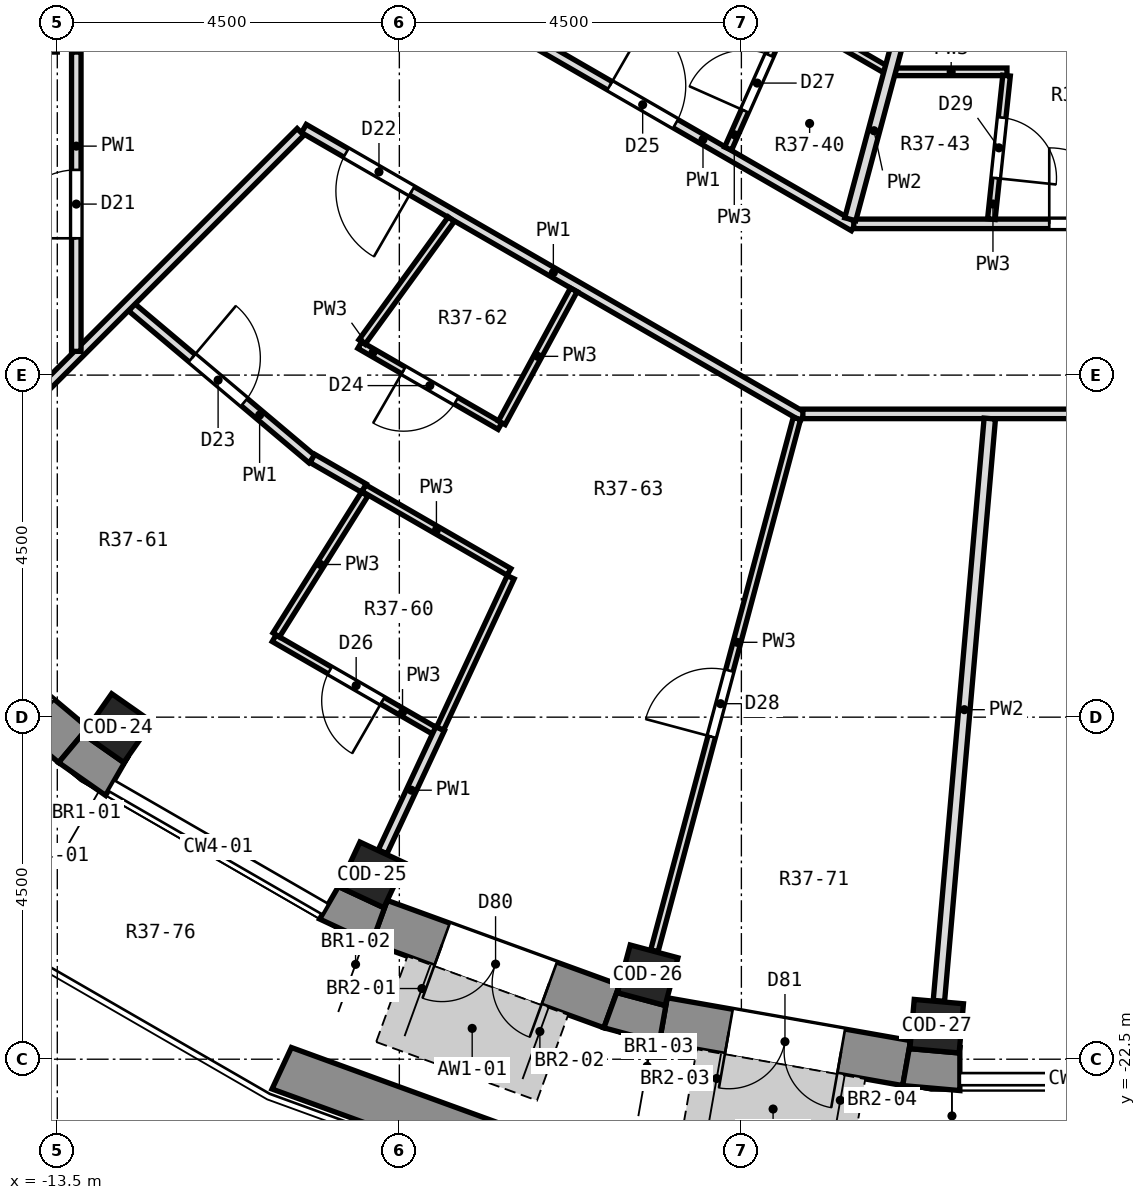
"""IFC4 building model, lengths in metres.
Left out: names, types, materials, properties, quantities, classifications, styles, units other than length and angle.
Written with IfcOpenShell. Run it as: python <this file> out.ifc"""

import sys

from ifc_helpers import new_model, si_unit, direction, frame, frame_2d, origin, origin_2d, place, context, subcontext, project, spatial, polyline, rectangle, outline, extrude, element, fill, save


model = new_model("IFC4")
c1 = context("Model", 3, precision=1e-05, world=origin(), true_north=direction((0.0, 1.0)))
c2 = subcontext(c1, "Body", "Model", "MODEL_VIEW")
j1 = project(units=[si_unit("LENGTHUNIT", "METRE"), si_unit("PLANEANGLEUNIT", "RADIAN")], contexts=[c1])
p1 = place(None, origin())
s1 = spatial("IfcSite", under=j1, at=p1, CompositionType="ELEMENT")
p2 = place(p1, origin())
s2 = spatial("IfcBuilding", under=s1, at=p2, CompositionType="ELEMENT")
p3 = place(p2, frame((0.0, 0.0, 269.3)))
s3 = spatial("IfcBuildingStorey", under=s2, at=p3, CompositionType="ELEMENT", Elevation=269.3)
for number, where, z_axis, x_axis in (
    (1, (-12.705, -18.144, 0.0), (0.0, 0.0, 1.0), (-0.574, -0.819, 0.0)),
    (2, (-9.361, -20.075, 0.0), (0.0, 0.0, 1.0), (-0.423, -0.906, 0.0)),
    (3, (-5.733, -21.395, 0.0), (0.0, 0.0, 1.0), (-0.259, -0.966, 0.0)),
    (4, (-1.93, -22.066, 0.0), (0.0, 0.0, 1.0), (-0.087, -0.996, 0.0)),
):
    element("IfcColumn", number, at=place(p3, frame(where, z_axis=z_axis, x_axis=x_axis)), inside=s3, PredefinedType="COLUMN", context=c2, shape_type="SweptSolid", body=[
        extrude(rectangle(XDim=0.65, YDim=0.65, at=origin_2d()), origin(), (0.0, 0.0, 1.0), 3.3),
    ])
p4 = place(p3, frame((-15.781, -16.277, 0.0), z_axis=(0.0, 0.0, 1.0), x_axis=(0.766056773982, -0.64277291405, 0.0)))
e5 = element("IfcWall", 5, at=p4, inside=s3, PredefinedType="SOLIDWALL", context=c2, shape_type="SweptSolid", body=[
    extrude(rectangle(XDim=3.252, YDim=0.6, at=frame_2d((1.626, 0.0))), origin(), (0.0, 0.0, 1.0), 2.9),
])
p5 = place(p4, frame((0.576, 0.0, 0.9)))
e6 = element("IfcOpeningElement", 6, at=p5, cuts=e5, PredefinedType="OPENING", context=c2, shape_type="SweptSolid", body=[
    extrude(rectangle(XDim=2.1, YDim=1.8, at=frame_2d((1.05, 0.9))), frame((0.0, 0.312, 0.0), z_axis=(0.0, -1.0, 0.0), x_axis=(1.0, 0.0, 0.0)), (0.0, 0.0, 1.0), 0.624),
])
p6 = place(p3, frame((-9.262, -20.693, 0.0), z_axis=(0.0, 0.0, 1.0), x_axis=(0.939679383794, -0.342056509473, 0.0)))
e7 = element("IfcWall", 7, at=p6, inside=s3, PredefinedType="SOLIDWALL", context=c2, shape_type="SweptSolid", body=[
    extrude(rectangle(XDim=3.252, YDim=0.6, at=frame_2d((1.626, 0.0))), origin(), (0.0, 0.0, 1.0), 2.9),
])
p7 = place(p6, frame((0.876, 0.0, 0.0)))
e8 = element("IfcOpeningElement", 8, at=p7, cuts=e7, PredefinedType="OPENING", context=c2, shape_type="SweptSolid", body=[
    extrude(rectangle(XDim=1.5, YDim=2.4, at=frame_2d((0.75, 1.2))), frame((0.0, 0.312, 0.0), z_axis=(0.0, -1.0, 0.0), x_axis=(1.0, 0.0, 0.0)), (0.0, 0.0, 1.0), 0.624),
])
p8 = place(p3, frame((-5.528, -21.987, 0.0), z_axis=(0.0, 0.0, 1.0), x_axis=(0.984806225186, -0.173656842178, 0.0)))
e9 = element("IfcWall", 9, at=p8, inside=s3, PredefinedType="SOLIDWALL", context=c2, shape_type="SweptSolid", body=[
    extrude(rectangle(XDim=3.252, YDim=0.6, at=frame_2d((1.626, 0.0))), origin(), (0.0, 0.0, 1.0), 2.9),
])
p9 = place(p8, frame((0.876, 0.0, 0.0)))
e10 = element("IfcOpeningElement", 10, at=p9, cuts=e9, PredefinedType="OPENING", context=c2, shape_type="SweptSolid", body=[
    extrude(rectangle(XDim=1.5, YDim=2.4, at=frame_2d((0.75, 1.2))), frame((0.0, 0.312, 0.0), z_axis=(0.0, -1.0, 0.0), x_axis=(1.0, 0.0, 0.0)), (0.0, 0.0, 1.0), 0.624),
])
p10 = place(p3, origin())
e11 = element("IfcWall", 11, at=p10, inside=s3, PredefinedType="SOLIDWALL", context=c2, shape_type="SweptSolid", body=[
    extrude(outline(polyline([(-12.864, -19.03), (-12.564, -18.51), (-12.625, -18.597), (-13.157, -18.224), (-13.097, -18.137), (-13.482, -18.597), (-12.864, -19.03)])), origin(), (0.0, 0.0, 1.0), 2.9),
])
p11 = place(p3, origin())
e12 = element("IfcWall", 12, at=p11, inside=s3, PredefinedType="SOLIDWALL", context=c2, shape_type="SweptSolid", body=[
    extrude(outline(polyline([(-10.048, -20.656), (-9.364, -20.975), (-9.159, -20.411), (-9.204, -20.507), (-9.793, -20.232), (-9.748, -20.136), (-10.048, -20.656)])), origin(), (0.0, 0.0, 1.0), 2.9),
])
p12 = place(p3, origin())
e13 = element("IfcWall", 13, at=p12, inside=s3, PredefinedType="SOLIDWALL", context=c2, shape_type="SweptSolid", body=[
    extrude(outline(polyline([(-5.58, -22.282), (-5.476, -21.691), (-5.503, -21.793), (-6.131, -21.625), (-6.104, -21.523), (-6.309, -22.087), (-5.58, -22.282)])), origin(), (0.0, 0.0, 1.0), 2.9),
])
p13 = place(p3, origin())
e14 = element("IfcWall", 14, at=p13, inside=s3, PredefinedType="SOLIDWALL", context=c2, shape_type="SweptSolid", body=[
    extrude(outline(polyline([(-2.378, -22.847), (-1.626, -22.913), (-1.626, -22.312), (-1.635, -22.418), (-2.283, -22.361), (-2.273, -22.256), (-2.378, -22.847)])), origin(), (0.0, 0.0, 1.0), 2.9),
])
p14 = place(p3, origin())
e15 = element("IfcWall", 15, at=p14, inside=s3, PredefinedType="PARAPET", context=c2, shape_type="SweptSolid", body=[
    extrude(outline(polyline([(-10.675, -22.892), (-6.537, -24.398), (-2.201, -25.163), (-2.149, -24.562), (-6.382, -23.816), (-10.42, -22.346), (-10.675, -22.892)])), origin(), (0.0, 0.0, 1.0), 0.5),
])
p15 = place(p3, frame((-12.521, -12.608, 0.0), z_axis=(0.0, 0.0, 1.0), x_axis=(0.764770295867, -0.644303030071, 0.0)))
e16 = element("IfcWall", 16, at=p15, inside=s3, PredefinedType="PARTITIONING", context=c2, shape_type="SweptSolid", body=[
    extrude(rectangle(XDim=3.101, YDim=0.125, at=frame_2d((1.55, 0.0))), origin(), (0.0, 0.0, 1.0), 2.9),
])
p16 = place(p15, frame((1.036, 0.0, 0.0)))
e17 = element("IfcOpeningElement", 17, at=p16, cuts=e16, PredefinedType="OPENING", context=c2, shape_type="SweptSolid", body=[
    extrude(rectangle(XDim=0.9, YDim=2.1, at=frame_2d((0.45, 1.05))), frame((0.0, 0.074, 0.0), z_axis=(0.0, -1.0, 0.0), x_axis=(1.0, 0.0, 0.0)), (0.0, 0.0, 1.0), 0.149),
])
p17 = place(p3, frame((-10.647, -16.962, 0.0), z_axis=(0.0, 0.0, 1.0), x_axis=(0.866072215893, -0.499918910283, 0.0)))
e18 = element("IfcWall", 18, at=p17, inside=s3, PredefinedType="PARTITIONING", context=c2, shape_type="SweptSolid", body=[
    extrude(rectangle(XDim=2.438, YDim=0.1, at=frame_2d((1.219, 0.0))), origin(), (0.0, 0.0, 1.0), 2.9),
])
p18 = place(p17, frame((0.846, 0.0, 0.0)))
e19 = element("IfcOpeningElement", 19, at=p18, cuts=e18, PredefinedType="OPENING", context=c2, shape_type="SweptSolid", body=[
    extrude(rectangle(XDim=0.8, YDim=2.1, at=frame_2d((0.4, 1.05))), frame((0.0, 0.062, 0.0), z_axis=(0.0, -1.0, 0.0), x_axis=(1.0, 0.0, 0.0)), (0.0, 0.0, 1.0), 0.124),
])
p19 = place(p3, frame((-9.467, -14.986, 0.0), z_axis=(0.0, 0.0, 1.0), x_axis=(0.866006764117, -0.500032283461, 0.0)))
e20 = element("IfcWall", 20, at=p19, inside=s3, PredefinedType="PARTITIONING", context=c2, shape_type="SweptSolid", body=[
    extrude(rectangle(XDim=2.205, YDim=0.1, at=frame_2d((1.103, 0.0))), origin(), (0.0, 0.0, 1.0), 2.9),
])
p20 = place(p3, frame((-10.144, -14.596, 0.0), z_axis=(0.0, 0.0, 1.0), x_axis=(0.866487258755, -0.499199189117, 0.0)))
e21 = element("IfcWall", 21, at=p20, inside=s3, PredefinedType="PARTITIONING", context=c2, shape_type="SweptSolid", body=[
    extrude(rectangle(XDim=0.781, YDim=0.125, at=frame_2d((0.391, 0.0))), origin(), (0.0, 0.0, 1.0), 2.9),
])
p21 = place(p3, frame((-9.521, -13.105, 0.0), z_axis=(0.0, 0.0, 1.0), x_axis=(0.865878308353, -0.500254690257, 0.0)))
e22 = element("IfcWall", 22, at=p21, inside=s3, PredefinedType="PARTITIONING", context=c2, shape_type="SweptSolid", body=[
    extrude(rectangle(XDim=2.131, YDim=0.1, at=frame_2d((1.065, 0.0))), origin(), (0.0, 0.0, 1.0), 2.9),
])
p22 = place(p21, frame((0.665, 0.0, 0.0)))
e23 = element("IfcOpeningElement", 23, at=p22, cuts=e22, PredefinedType="OPENING", context=c2, shape_type="SweptSolid", body=[
    extrude(rectangle(XDim=0.8, YDim=2.1, at=frame_2d((0.4, 1.05))), frame((0.0, 0.062, 0.0), z_axis=(0.0, -1.0, 0.0), x_axis=(1.0, 0.0, 0.0)), (0.0, 0.0, 1.0), 0.124),
])
p23 = place(p3, frame((-10.256, -10.256, 0.0), z_axis=(0.0, 0.0, 1.0), x_axis=(0.866032740159, -0.499987292811, 0.0)))
e24 = element("IfcWall", 24, at=p23, inside=s3, PredefinedType="PARTITIONING", context=c2, shape_type="SweptSolid", body=[
    extrude(rectangle(XDim=7.581, YDim=0.125, at=frame_2d((3.791, 0.0))), origin(), (0.0, 0.0, 1.0), 2.9),
])
p24 = place(p23, frame((0.641, 0.0, 0.0)))
e25 = element("IfcOpeningElement", 25, at=p24, cuts=e24, PredefinedType="OPENING", context=c2, shape_type="SweptSolid", body=[
    extrude(rectangle(XDim=1.0, YDim=2.1, at=frame_2d((0.5, 1.05))), frame((0.0, 0.074, 0.0), z_axis=(0.0, -1.0, 0.0), x_axis=(1.0, 0.0, 0.0)), (0.0, 0.0, 1.0), 0.149),
])
p25 = place(p3, frame((-8.426, -8.426, 0.0), z_axis=(0.0, 0.0, 1.0), x_axis=(0.866039004929, -0.499976441387, 0.0)))
e26 = element("IfcWall", 26, at=p25, inside=s3, PredefinedType="PARTITIONING", context=c2, shape_type="SweptSolid", body=[
    extrude(rectangle(XDim=6.24, YDim=0.125, at=frame_2d((3.12, 0.0))), origin(), (0.0, 0.0, 1.0), 2.9),
])
p26 = place(p25, frame((2.534, 0.0, 0.0)))
e27 = element("IfcOpeningElement", 27, at=p26, cuts=e26, PredefinedType="OPENING", context=c2, shape_type="SweptSolid", body=[
    extrude(rectangle(XDim=1.0, YDim=2.1, at=frame_2d((0.5, 1.05))), frame((0.0, 0.074, 0.0), z_axis=(0.0, -1.0, 0.0), x_axis=(1.0, 0.0, 0.0)), (0.0, 0.0, 1.0), 0.149),
])
p27 = place(p3, frame((-3.884, -8.739, 0.0), z_axis=(0.0, 0.0, 1.0), x_axis=(0.866146805758, -0.499789666634, 0.0)))
e28 = element("IfcWall", 28, at=p27, inside=s3, PredefinedType="PARTITIONING", context=c2, shape_type="SweptSolid", body=[
    extrude(rectangle(XDim=1.468, YDim=0.1, at=frame_2d((0.734, 0.0))), origin(), (0.0, 0.0, 1.0), 2.9),
])
p28 = place(p3, frame((-3.691, -14.01, 0.0), z_axis=(0.0, 0.0, 1.0), x_axis=(1.0, 0.0, 0.0)))
e29 = element("IfcWall", 29, at=p28, inside=s3, PredefinedType="PARTITIONING", context=c2, shape_type="SweptSolid", body=[
    extrude(rectangle(XDim=7.517, YDim=0.125, at=frame_2d((3.759, 0.0))), origin(), (0.0, 0.0, 1.0), 2.9),
])
p29 = place(p3, frame((-3.021, -11.51, 0.0), z_axis=(0.0, 0.0, 1.0), x_axis=(1.0, 0.0, 0.0)))
e30 = element("IfcWall", 30, at=p29, inside=s3, PredefinedType="PARTITIONING", context=c2, shape_type="SweptSolid", body=[
    extrude(rectangle(XDim=6.192, YDim=0.125, at=frame_2d((3.096, 0.0))), origin(), (0.0, 0.0, 1.0), 2.9),
])
p30 = place(p29, frame((2.572, 0.0, 0.0)))
e31 = element("IfcOpeningElement", 31, at=p30, cuts=e30, PredefinedType="OPENING", context=c2, shape_type="SweptSolid", body=[
    extrude(rectangle(XDim=1.0, YDim=2.1, at=frame_2d((0.5, 1.05))), frame((0.0, 0.074, 0.0), z_axis=(0.0, -1.0, 0.0), x_axis=(1.0, 0.0, 0.0)), (0.0, 0.0, 1.0), 0.149),
])
p31 = place(p3, frame((-2.473, -9.51, 0.0), z_axis=(0.0, 0.0, 1.0), x_axis=(1.0, 0.0, 0.0)))
e32 = element("IfcWall", 32, at=p31, inside=s3, PredefinedType="PARTITIONING", context=c2, shape_type="SweptSolid", body=[
    extrude(rectangle(XDim=1.467, YDim=0.1, at=frame_2d((0.733, 0.0))), origin(), (0.0, 0.0, 1.0), 2.9),
])
p32 = place(p3, frame((-15.426, -15.426, 0.0), z_axis=(0.0, 0.0, 1.0), x_axis=(0.707106781187, 0.707106781187, 0.0)))
e33 = element("IfcWall", 33, at=p32, inside=s3, PredefinedType="PARTITIONING", context=c2, shape_type="SweptSolid", body=[
    extrude(rectangle(XDim=7.248, YDim=0.125, at=frame_2d((3.624, 0.0))), origin(), (0.0, 0.0, 1.0), 2.9),
])
p33 = place(p3, frame((-9.492, -13.064, 0.0), z_axis=(0.0, 0.0, 1.0), x_axis=(0.587873893167, 0.80895258559, 0.0)))
e34 = element("IfcWall", 34, at=p33, inside=s3, PredefinedType="PARTITIONING", context=c2, shape_type="SweptSolid", body=[
    extrude(rectangle(XDim=1.999, YDim=0.1, at=frame_2d((1.0, 0.0))), origin(), (0.0, 0.0, 1.0), 2.9),
])
p34 = place(p3, frame((-10.619, -16.918, 0.0), z_axis=(0.0, 0.0, 1.0), x_axis=(0.531622942945, 0.84698113706, 0.0)))
e35 = element("IfcWall", 35, at=p34, inside=s3, PredefinedType="PARTITIONING", context=c2, shape_type="SweptSolid", body=[
    extrude(rectangle(XDim=2.188, YDim=0.1, at=frame_2d((1.094, 0.0))), origin(), (0.0, 0.0, 1.0), 2.9),
])
p35 = place(p3, frame((-7.652, -14.127, 0.0), z_axis=(0.0, 0.0, 1.0), x_axis=(0.476243596433, 0.879313389444, 0.0)))
e36 = element("IfcWall", 36, at=p35, inside=s3, PredefinedType="PARTITIONING", context=c2, shape_type="SweptSolid", body=[
    extrude(rectangle(XDim=1.989, YDim=0.1, at=frame_2d((0.994, 0.0))), origin(), (0.0, 0.0, 1.0), 2.9),
])
p36 = place(p3, frame((-9.22, -19.771, 0.0), z_axis=(0.0, 0.0, 1.0), x_axis=(0.423191849194, 0.906040097775, 0.0)))
e37 = element("IfcWall", 37, at=p36, inside=s3, PredefinedType="PARTITIONING", context=c2, shape_type="SweptSolid", body=[
    extrude(rectangle(XDim=1.788, YDim=0.125, at=frame_2d((0.894, 0.0))), origin(), (0.0, 0.0, 1.0), 2.9),
])
p37 = place(p3, frame((-8.464, -18.15, 0.0), z_axis=(0.0, 0.0, 1.0), x_axis=(0.422599526454, 0.906316523208, 0.0)))
e38 = element("IfcWall", 38, at=p37, inside=s3, PredefinedType="PARTITIONING", context=c2, shape_type="SweptSolid", body=[
    extrude(rectangle(XDim=2.197, YDim=0.1, at=frame_2d((1.099, 0.0))), origin(), (0.0, 0.0, 1.0), 2.9),
])
p38 = place(p3, frame((-4.675, -10.52, 0.0), z_axis=(0.0, 0.0, 1.0), x_axis=(0.40574466239, 0.913986470875, 0.0)))
e39 = element("IfcWall", 39, at=p38, inside=s3, PredefinedType="PARTITIONING", context=c2, shape_type="SweptSolid", body=[
    extrude(rectangle(XDim=1.898, YDim=0.1, at=frame_2d((0.949, 0.0))), origin(), (0.0, 0.0, 1.0), 2.9),
])
p39 = place(p38, frame((0.543, 0.0, 0.0)))
e40 = element("IfcOpeningElement", 40, at=p39, cuts=e39, PredefinedType="OPENING", context=c2, shape_type="SweptSolid", body=[
    extrude(rectangle(XDim=0.8, YDim=2.1, at=frame_2d((0.4, 1.05))), frame((0.0, 0.062, 0.0), z_axis=(0.0, -1.0, 0.0), x_axis=(1.0, 0.0, 0.0)), (0.0, 0.0, 1.0), 0.124),
])
p40 = place(p3, frame((-5.644, -21.072, 0.0), z_axis=(0.0, 0.0, 1.0), x_axis=(0.258605886827, 0.96598291667, 0.0)))
e41 = element("IfcWall", 41, at=p40, inside=s3, PredefinedType="PARTITIONING", context=c2, shape_type="SweptSolid", body=[
    extrude(rectangle(XDim=7.249, YDim=0.1, at=frame_2d((3.624, 0.0))), origin(), (0.0, 0.0, 1.0), 2.9),
])
p41 = place(p40, frame((2.914, 0.0, 0.0)))
e42 = element("IfcOpeningElement", 42, at=p41, cuts=e41, PredefinedType="OPENING", context=c2, shape_type="SweptSolid", body=[
    extrude(rectangle(XDim=0.9, YDim=2.1, at=frame_2d((0.45, 1.05))), frame((0.0, 0.062, 0.0), z_axis=(0.0, -1.0, 0.0), x_axis=(1.0, 0.0, 0.0)), (0.0, 0.0, 1.0), 0.124),
])
p42 = place(p3, frame((-3.068, -11.45, 0.0), z_axis=(0.0, 0.0, 1.0), x_axis=(0.258796817064, 0.965931782, 0.0)))
e43 = element("IfcWall", 43, at=p42, inside=s3, PredefinedType="PARTITIONING", context=c2, shape_type="SweptSolid", body=[
    extrude(rectangle(XDim=2.411, YDim=0.15, at=frame_2d((1.206, 0.0))), origin(), (0.0, 0.0, 1.0), 2.9),
])
p43 = place(p3, frame((-1.211, -11.448, 0.0), z_axis=(0.0, 0.0, 1.0), x_axis=(0.105447867905, 0.99442483233, 0.0)))
e44 = element("IfcWall", 44, at=p43, inside=s3, PredefinedType="PARTITIONING", context=c2, shape_type="SweptSolid", body=[
    extrude(rectangle(XDim=1.898, YDim=0.1, at=frame_2d((0.949, 0.0))), origin(), (0.0, 0.0, 1.0), 2.9),
])
p44 = place(p43, frame((0.543, 0.0, 0.0)))
e45 = element("IfcOpeningElement", 45, at=p44, cuts=e44, PredefinedType="OPENING", context=c2, shape_type="SweptSolid", body=[
    extrude(rectangle(XDim=0.8, YDim=2.1, at=frame_2d((0.4, 1.05))), frame((0.0, 0.062, 0.0), z_axis=(0.0, -1.0, 0.0), x_axis=(1.0, 0.0, 0.0)), (0.0, 0.0, 1.0), 0.124),
])
p45 = place(p3, frame((-1.901, -21.732, 0.0), z_axis=(0.0, 0.0, 1.0), x_axis=(0.087062572149, 0.996202845073, 0.0)))
e46 = element("IfcWall", 46, at=p45, inside=s3, PredefinedType="PARTITIONING", context=c2, shape_type="SweptSolid", body=[
    extrude(rectangle(XDim=7.689, YDim=0.15, at=frame_2d((3.845, 0.0))), origin(), (0.0, 0.0, 1.0), 2.9),
])
p46 = place(p3, frame((-13.25, -13.188, 0.0), z_axis=(0.0, 0.0, 1.0), x_axis=(0.0, 1.0, 0.0)))
e47 = element("IfcWall", 47, at=p46, inside=s3, PredefinedType="PARTITIONING", context=c2, shape_type="SweptSolid", body=[
    extrude(rectangle(XDim=3.938, YDim=0.125, at=frame_2d((1.969, 0.0))), origin(), (0.0, 0.0, 1.0), 2.9),
])
p47 = place(p46, frame((1.488, 0.0, 0.0)))
e48 = element("IfcOpeningElement", 48, at=p47, cuts=e47, PredefinedType="OPENING", context=c2, shape_type="SweptSolid", body=[
    extrude(rectangle(XDim=0.9, YDim=2.1, at=frame_2d((0.45, 1.05))), frame((0.0, 0.074, 0.0), z_axis=(0.0, -1.0, 0.0), x_axis=(1.0, 0.0, 0.0)), (0.0, 0.0, 1.0), 0.149),
])
p48 = place(p7, frame((1.5, 0.0, 0.0), z_axis=(0.0, 0.0, 1.0), x_axis=(-1.0, 0.0, 0.0)))
e49 = element("IfcDoor", 49, at=p48, inside=s3, OperationType="DOUBLE_DOOR_SINGLE_SWING", PredefinedType="DOOR", context=c2, shape_type="SweptSolid", body=[
    extrude(rectangle(XDim=1.5, YDim=2.4, at=frame_2d((0.75, 1.2))), frame((0.0, -0.075, 0.0), z_axis=(0.0, -1.0, 0.0), x_axis=(1.0, 0.0, 0.0)), (0.0, 0.0, 1.0), 0.05),
])
fill(e8, e49)
p49 = place(p9, frame((1.5, 0.0, 0.0), z_axis=(0.0, 0.0, 1.0), x_axis=(-1.0, 0.0, 0.0)))
e50 = element("IfcDoor", 50, at=p49, inside=s3, OperationType="DOUBLE_DOOR_SINGLE_SWING", PredefinedType="DOOR", context=c2, shape_type="SweptSolid", body=[
    extrude(rectangle(XDim=1.5, YDim=2.4, at=frame_2d((0.75, 1.2))), frame((0.0, -0.075, 0.0), z_axis=(0.0, -1.0, 0.0), x_axis=(1.0, 0.0, 0.0)), (0.0, 0.0, 1.0), 0.05),
])
fill(e10, e50)
p50 = place(p47, origin())
e51 = element("IfcDoor", 51, at=p50, inside=s3, OperationType="SINGLE_SWING_LEFT", PredefinedType="DOOR", context=c2, shape_type="SweptSolid", body=[
    extrude(rectangle(XDim=0.9, YDim=2.1, at=frame_2d((0.45, 1.05))), frame((0.0, 0.025, 0.0), z_axis=(0.0, -1.0, 0.0), x_axis=(1.0, 0.0, 0.0)), (0.0, 0.0, 1.0), 0.05),
])
fill(e48, e51)
p51 = place(p24, frame((1.0, 0.0, 0.0), z_axis=(0.0, 0.0, 1.0), x_axis=(-1.0, 0.0, 0.0)))
e52 = element("IfcDoor", 52, at=p51, inside=s3, OperationType="SINGLE_SWING_LEFT", PredefinedType="DOOR", context=c2, shape_type="SweptSolid", body=[
    extrude(rectangle(XDim=1.0, YDim=2.1, at=frame_2d((0.5, 1.05))), frame((0.0, 0.025, 0.0), z_axis=(0.0, -1.0, 0.0), x_axis=(1.0, 0.0, 0.0)), (0.0, 0.0, 1.0), 0.05),
])
fill(e25, e52)
p52 = place(p16, origin())
e53 = element("IfcDoor", 53, at=p52, inside=s3, OperationType="SINGLE_SWING_LEFT", PredefinedType="DOOR", context=c2, shape_type="SweptSolid", body=[
    extrude(rectangle(XDim=0.9, YDim=2.1, at=frame_2d((0.45, 1.05))), frame((0.0, 0.025, 0.0), z_axis=(0.0, -1.0, 0.0), x_axis=(1.0, 0.0, 0.0)), (0.0, 0.0, 1.0), 0.05),
])
fill(e17, e53)
p53 = place(p22, frame((0.8, 0.0, 0.0), z_axis=(0.0, 0.0, 1.0), x_axis=(-1.0, 0.0, 0.0)))
e54 = element("IfcDoor", 54, at=p53, inside=s3, OperationType="SINGLE_SWING_RIGHT", PredefinedType="DOOR", context=c2, shape_type="SweptSolid", body=[
    extrude(rectangle(XDim=0.8, YDim=2.1, at=frame_2d((0.4, 1.05))), frame((0.0, 0.025, 0.0), z_axis=(0.0, -1.0, 0.0), x_axis=(1.0, 0.0, 0.0)), (0.0, 0.0, 1.0), 0.05),
])
fill(e23, e54)
p54 = place(p26, origin())
e55 = element("IfcDoor", 55, at=p54, inside=s3, OperationType="SINGLE_SWING_LEFT", PredefinedType="DOOR", context=c2, shape_type="SweptSolid", body=[
    extrude(rectangle(XDim=1.0, YDim=2.1, at=frame_2d((0.5, 1.05))), frame((0.0, 0.025, 0.0), z_axis=(0.0, -1.0, 0.0), x_axis=(1.0, 0.0, 0.0)), (0.0, 0.0, 1.0), 0.05),
])
fill(e27, e55)
p55 = place(p18, frame((0.8, 0.0, 0.0), z_axis=(0.0, 0.0, 1.0), x_axis=(-1.0, 0.0, 0.0)))
e56 = element("IfcDoor", 56, at=p55, inside=s3, OperationType="SINGLE_SWING_LEFT", PredefinedType="DOOR", context=c2, shape_type="SweptSolid", body=[
    extrude(rectangle(XDim=0.8, YDim=2.1, at=frame_2d((0.4, 1.05))), frame((0.0, 0.025, 0.0), z_axis=(0.0, -1.0, 0.0), x_axis=(1.0, 0.0, 0.0)), (0.0, 0.0, 1.0), 0.05),
])
fill(e19, e56)
p56 = place(p39, origin())
e57 = element("IfcDoor", 57, at=p56, inside=s3, OperationType="SINGLE_SWING_LEFT", PredefinedType="DOOR", context=c2, shape_type="SweptSolid", body=[
    extrude(rectangle(XDim=0.8, YDim=2.1, at=frame_2d((0.4, 1.05))), frame((0.0, 0.025, 0.0), z_axis=(0.0, -1.0, 0.0), x_axis=(1.0, 0.0, 0.0)), (0.0, 0.0, 1.0), 0.05),
])
fill(e40, e57)
p57 = place(p41, origin())
e58 = element("IfcDoor", 58, at=p57, inside=s3, OperationType="SINGLE_SWING_LEFT", PredefinedType="DOOR", context=c2, shape_type="SweptSolid", body=[
    extrude(rectangle(XDim=0.9, YDim=2.1, at=frame_2d((0.45, 1.05))), frame((0.0, 0.025, 0.0), z_axis=(0.0, -1.0, 0.0), x_axis=(1.0, 0.0, 0.0)), (0.0, 0.0, 1.0), 0.05),
])
fill(e42, e58)
p58 = place(p44, frame((0.8, 0.0, 0.0), z_axis=(0.0, 0.0, 1.0), x_axis=(-1.0, 0.0, 0.0)))
e59 = element("IfcDoor", 59, at=p58, inside=s3, OperationType="SINGLE_SWING_RIGHT", PredefinedType="DOOR", context=c2, shape_type="SweptSolid", body=[
    extrude(rectangle(XDim=0.8, YDim=2.1, at=frame_2d((0.4, 1.05))), frame((0.0, 0.025, 0.0), z_axis=(0.0, -1.0, 0.0), x_axis=(1.0, 0.0, 0.0)), (0.0, 0.0, 1.0), 0.05),
])
fill(e45, e59)
p59 = place(p30, origin())
e60 = element("IfcDoor", 60, at=p59, inside=s3, OperationType="SINGLE_SWING_LEFT", PredefinedType="DOOR", context=c2, shape_type="SweptSolid", body=[
    extrude(rectangle(XDim=1.0, YDim=2.1, at=frame_2d((0.5, 1.05))), frame((0.0, 0.025, 0.0), z_axis=(0.0, -1.0, 0.0), x_axis=(1.0, 0.0, 0.0)), (0.0, 0.0, 1.0), 0.05),
])
fill(e31, e60)
save(model, sys.argv[1])
